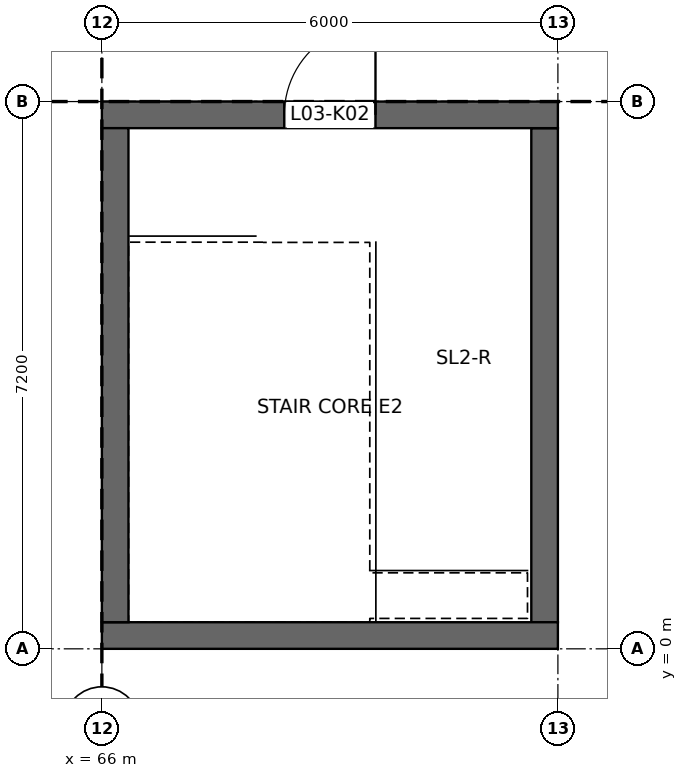
"""IFC4 building model, lengths in metres.
Left out: names, types, materials, properties, quantities, classifications, styles, units other than length and angle.
Written with IfcOpenShell. Run it as: python <this file> out.ifc"""

import sys

from ifc_helpers import new_model, si_unit, direction, frame, frame_2d, origin, place, context, subcontext, project, spatial, rectangle, extrude, element, fill, save


model = new_model("IFC4")
c1 = context("Model", 3, precision=1e-05, world=origin(), true_north=direction((0.0, 1.0)))
c2 = subcontext(c1, "Body", "Model", "MODEL_VIEW")
j1 = project(units=[si_unit("LENGTHUNIT", "METRE"), si_unit("PLANEANGLEUNIT", "RADIAN")], contexts=[c1])
p1 = place(None, origin())
s1 = spatial("IfcSite", under=j1, at=p1, CompositionType="ELEMENT")
p2 = place(p1, origin())
s2 = spatial("IfcBuilding", under=s1, at=p2, CompositionType="ELEMENT")
p3 = place(p2, frame((0.0, 0.0, 12.6)))
s3 = spatial("IfcBuildingStorey", under=s2, at=p3, CompositionType="ELEMENT", Elevation=12.6)
p4 = place(p3, frame((66.0, 0.175, 0.0), z_axis=(0.0, 0.0, 1.0), x_axis=(1.0, 0.0, 0.0)))
e1 = element("IfcWall", 1, at=p4, inside=s3, PredefinedType="SHEAR", context=c2, shape_type="SweptSolid", body=[
    extrude(rectangle(XDim=6.0, YDim=0.35, at=frame_2d((3.0, 0.0))), origin(), (0.0, 0.0, 1.0), 2.4),
])
p5 = place(p3, frame((66.0, 7.025, 0.0), z_axis=(0.0, 0.0, 1.0), x_axis=(1.0, 0.0, 0.0)))
e2 = element("IfcWall", 2, at=p5, inside=s3, PredefinedType="SHEAR", context=c2, shape_type="SweptSolid", body=[
    extrude(rectangle(XDim=6.0, YDim=0.35, at=frame_2d((3.0, 0.0))), origin(), (0.0, 0.0, 1.0), 2.4),
])
p6 = place(p5, frame((2.4, 0.0, 0.0)))
e3 = element("IfcOpeningElement", 3, at=p6, cuts=e2, PredefinedType="OPENING", context=c2, shape_type="SweptSolid", body=[
    extrude(rectangle(XDim=1.2, YDim=2.1, at=frame_2d((0.6, 1.05))), frame((0.0, 0.185, 0.0), z_axis=(0.0, -1.0, 0.0), x_axis=(1.0, 0.0, 0.0)), (0.0, 0.0, 1.0), 0.37),
])
for number, where, z_axis, x_axis in (
    (4, (66.175, 0.35, 0.0), (0.0, 0.0, 1.0), (0.0, 1.0, 0.0)),
    (5, (71.825, 0.35, 0.0), (0.0, 0.0, 1.0), (0.0, 1.0, 0.0)),
):
    element("IfcWall", number, at=place(p3, frame(where, z_axis=z_axis, x_axis=x_axis)), inside=s3, PredefinedType="SHEAR", context=c2, shape_type="SweptSolid", body=[
        extrude(rectangle(XDim=6.5, YDim=0.35, at=frame_2d((3.25, 0.0))), origin(), (0.0, 0.0, 1.0), 2.4),
    ])
p7 = place(p3, frame((71.91, 7.2, 0.0), z_axis=(0.0, 0.0, 1.0), x_axis=(0.0, 1.0, 0.0)))
e6 = element("IfcWall", 6, at=p7, inside=s3, PredefinedType="PARAPET", context=c2, shape_type="SweptSolid", body=[
    extrude(rectangle(XDim=14.4, YDim=0.18, at=frame_2d((7.2, 0.0))), origin(), (0.0, 0.0, 1.0), 1.1),
])
p8 = place(p3, frame((54.0, 0.09, 0.0), z_axis=(0.0, 0.0, 1.0), x_axis=(1.0, 0.0, 0.0)))
e7 = element("IfcWall", 7, at=p8, inside=s3, PredefinedType="PARAPET", context=c2, shape_type="SweptSolid", body=[
    extrude(rectangle(XDim=12.0, YDim=0.18, at=frame_2d((6.0, 0.0))), origin(), (0.0, 0.0, 1.0), 1.1),
])
p9 = place(p6, origin())
e8 = element("IfcDoor", 8, at=p9, inside=s3, OperationType="SINGLE_SWING_RIGHT", PredefinedType="DOOR", context=c2, shape_type="SweptSolid", body=[
    extrude(rectangle(XDim=1.2, YDim=2.1, at=frame_2d((0.6, 1.05))), frame((0.0, 0.025, 0.0), z_axis=(0.0, -1.0, 0.0), x_axis=(1.0, 0.0, 0.0)), (0.0, 0.0, 1.0), 0.05),
])
fill(e3, e8)
save(model, sys.argv[1])
